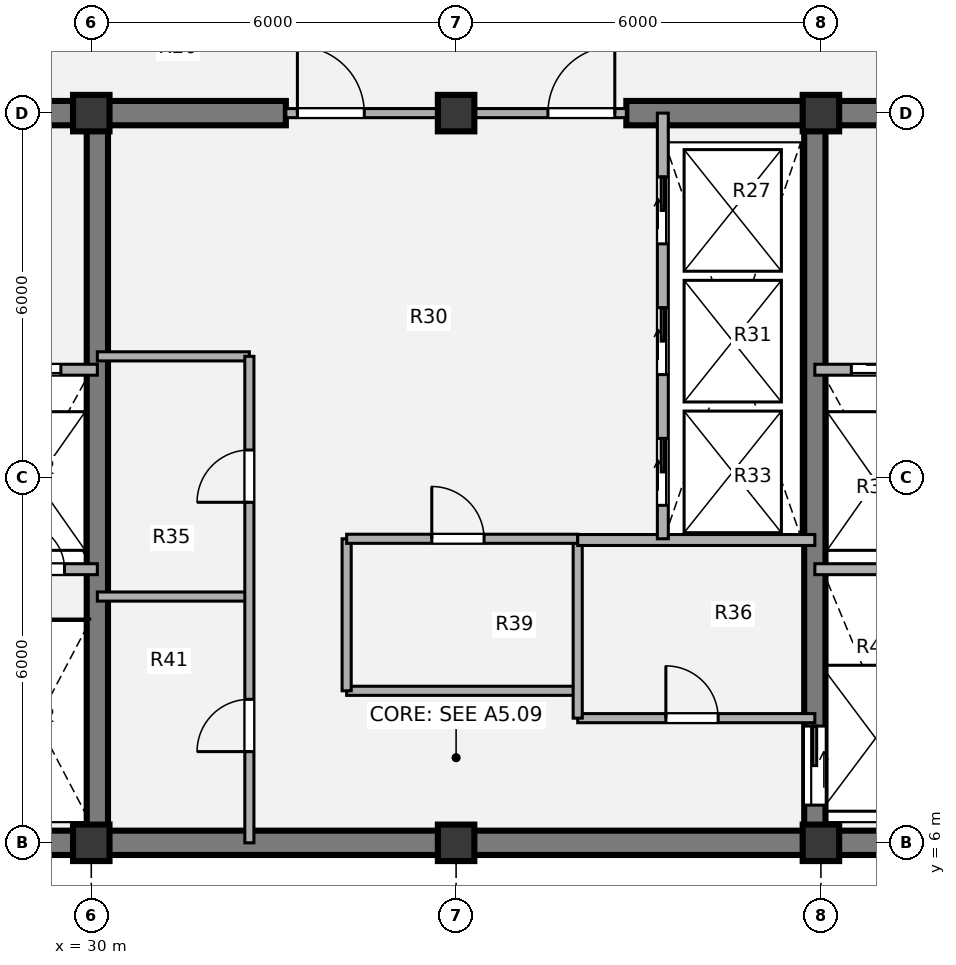
"""IFC4 building model, lengths in metres.
Left out: names, types, materials, properties, quantities, classifications, styles, units other than length and angle.
Written with IfcOpenShell. Run it as: python <this file> out.ifc"""

import sys

from ifc_helpers import new_model, si_unit, direction, frame, frame_2d, origin, origin_2d, place, context, subcontext, project, spatial, rectangle, extrude, source, transform, mapped, element, fill, save


model = new_model("IFC4")
c1 = context("Model", 3, precision=1e-05, world=origin(), true_north=direction((0.0, 1.0)))
c2 = subcontext(c1, "Body", "Model", "MODEL_VIEW")
j1 = project(units=[si_unit("LENGTHUNIT", "METRE"), si_unit("PLANEANGLEUNIT", "RADIAN")], contexts=[c1])
p1 = place(None, origin())
s1 = spatial("IfcSite", under=j1, at=p1, CompositionType="ELEMENT")
p2 = place(p1, origin())
s2 = spatial("IfcBuilding", under=s1, at=p2, CompositionType="ELEMENT")
p3 = place(p2, frame((0.0, 0.0, 238.14)))
s3 = spatial("IfcBuildingStorey", under=s2, at=p3, CompositionType="ELEMENT", Elevation=238.14)
m1 = source(origin(), c2, "Body", "SweptSolid", [
    extrude(rectangle(XDim=0.6, YDim=0.6, at=origin_2d()), origin(), (0.0, 0.0, 1.0), 3.78),
])
for number, where, z_axis, x_axis in (
    (1, (30.0, 6.0, 0.0), (0.0, 0.0, 1.0), (1.0, 0.0, 0.0)),
    (2, (36.0, 6.0, 0.0), (0.0, 0.0, 1.0), (1.0, 0.0, 0.0)),
    (3, (42.0, 6.0, 0.0), (0.0, 0.0, 1.0), (1.0, 0.0, 0.0)),
    (4, (30.0, 18.0, 0.0), (0.0, 0.0, 1.0), (1.0, 0.0, 0.0)),
    (5, (36.0, 18.0, 0.0), (0.0, 0.0, 1.0), (1.0, 0.0, 0.0)),
    (6, (42.0, 18.0, 0.0), (0.0, 0.0, 1.0), (1.0, 0.0, 0.0)),
):
    element("IfcColumn", number, at=place(p3, frame(where, z_axis=z_axis, x_axis=x_axis)), inside=s3, PredefinedType="COLUMN", context=c2, shape_type="MappedRepresentation", body=[
        mapped(m1, transform((0.0, 0.0, 0.0), x_axis=(1.0, 0.0, 0.0), y_axis=(0.0, 1.0, 0.0), z_axis=(0.0, 0.0, 1.0), scale=1.0)),
    ])
p4 = place(p3, frame((48.2, 6.0, 0.0), z_axis=(0.0, 0.0, 1.0), x_axis=(-1.0, 0.0, 0.0)))
e7 = element("IfcWall", 7, at=p4, inside=s3, PredefinedType="SHEAR", context=c2, shape_type="SweptSolid", body=[
    extrude(rectangle(XDim=24.4, YDim=0.4, at=frame_2d((12.2, 0.0))), origin(), (0.0, 0.0, 1.0), 3.78),
])
p5 = place(p3, frame((23.8, 18.0, 0.0), z_axis=(0.0, 0.0, 1.0), x_axis=(1.0, 0.0, 0.0)))
e8 = element("IfcWall", 8, at=p5, inside=s3, PredefinedType="SHEAR", context=c2, shape_type="SweptSolid", body=[
    extrude(rectangle(XDim=9.4, YDim=0.4, at=frame_2d((4.7, 0.0))), origin(), (0.0, 0.0, 1.0), 3.78),
])
p6 = place(p5, frame((2.95, 0.0, 0.0)))
e9 = element("IfcOpeningElement", 9, at=p6, cuts=e8, PredefinedType="OPENING", context=c2, shape_type="SweptSolid", body=[
    extrude(rectangle(XDim=1.1, YDim=2.1, at=origin_2d()), frame((0.55, 0.21, 1.05), z_axis=(0.0, -1.0, 0.0), x_axis=(1.0, 0.0, 0.0)), (0.0, 0.0, 1.0), 0.42),
])
p7 = place(p3, frame((38.8, 18.0, 0.0), z_axis=(0.0, 0.0, 1.0), x_axis=(1.0, 0.0, 0.0)))
e10 = element("IfcWall", 10, at=p7, inside=s3, PredefinedType="SHEAR", context=c2, shape_type="SweptSolid", body=[
    extrude(rectangle(XDim=9.4, YDim=0.4, at=frame_2d((4.7, 0.0))), origin(), (0.0, 0.0, 1.0), 3.78),
])
p8 = place(p7, frame((5.45, 0.0, 0.0)))
e11 = element("IfcOpeningElement", 11, at=p8, cuts=e10, PredefinedType="OPENING", context=c2, shape_type="SweptSolid", body=[
    extrude(rectangle(XDim=1.1, YDim=2.1, at=origin_2d()), frame((0.55, 0.21, 1.05), z_axis=(0.0, -1.0, 0.0), x_axis=(1.0, 0.0, 0.0)), (0.0, 0.0, 1.0), 0.42),
])
p9 = place(p3, frame((30.1, 6.0, 0.0), z_axis=(0.0, 0.0, 1.0), x_axis=(0.0, 1.0, 0.0)))
e12 = element("IfcWall", 12, at=p9, inside=s3, PredefinedType="SHEAR", context=c2, shape_type="SweptSolid", body=[
    extrude(rectangle(XDim=12.0, YDim=0.35, at=frame_2d((6.0, 0.0))), origin(), (0.0, 0.0, 1.0), 3.78),
])
p10 = place(p3, frame((41.9, 18.0, 0.0), z_axis=(0.0, 0.0, 1.0), x_axis=(0.0, -1.0, 0.0)))
e13 = element("IfcWall", 13, at=p10, inside=s3, PredefinedType="SHEAR", context=c2, shape_type="SweptSolid", body=[
    extrude(rectangle(XDim=12.0, YDim=0.35, at=frame_2d((6.0, 0.0))), origin(), (0.0, 0.0, 1.0), 3.78),
])
p11 = place(p10, frame((10.08, 0.0, 0.0)))
e14 = element("IfcOpeningElement", 14, at=p11, cuts=e13, PredefinedType="OPENING", context=c2, shape_type="SweptSolid", body=[
    extrude(rectangle(XDim=1.3, YDim=2.1, at=origin_2d()), frame((0.65, 0.185, 1.05), z_axis=(0.0, -1.0, 0.0), x_axis=(1.0, 0.0, 0.0)), (0.0, 0.0, 1.0), 0.37),
])
p12 = place(p3, frame((30.1, 14.0, 0.0), z_axis=(0.0, 0.0, 1.0), x_axis=(1.0, 0.0, 0.0)))
e15 = element("IfcWall", 15, at=p12, inside=s3, PredefinedType="PARTITIONING", context=c2, shape_type="SweptSolid", body=[
    extrude(rectangle(XDim=2.5, YDim=0.15, at=frame_2d((1.25, 0.0))), origin(), (0.0, 0.0, 1.0), 3.5),
])
p13 = place(p3, frame((34.2, 8.5, 0.0), z_axis=(0.0, 0.0, 1.0), x_axis=(1.0, 0.0, 0.0)))
e16 = element("IfcWall", 16, at=p13, inside=s3, PredefinedType="PARTITIONING", context=c2, shape_type="SweptSolid", body=[
    extrude(rectangle(XDim=3.8, YDim=0.15, at=frame_2d((1.9, 0.0))), origin(), (0.0, 0.0, 1.0), 3.5),
])
p14 = place(p3, frame((38.0, 8.05, 0.0), z_axis=(0.0, 0.0, 1.0), x_axis=(1.0, 0.0, 0.0)))
e17 = element("IfcWall", 17, at=p14, inside=s3, PredefinedType="PARTITIONING", context=c2, shape_type="SweptSolid", body=[
    extrude(rectangle(XDim=3.9, YDim=0.15, at=frame_2d((1.95, 0.0))), origin(), (0.0, 0.0, 1.0), 3.5),
])
p15 = place(p14, frame((1.45, 0.0, 0.0)))
e18 = element("IfcOpeningElement", 18, at=p15, cuts=e17, PredefinedType="OPENING", context=c2, shape_type="SweptSolid", body=[
    extrude(rectangle(XDim=0.86, YDim=2.1, at=origin_2d()), frame((0.43, 0.085, 1.05), z_axis=(0.0, -1.0, 0.0), x_axis=(1.0, 0.0, 0.0)), (0.0, 0.0, 1.0), 0.17),
])
p16 = place(p3, frame((34.2, 8.5, 0.0), z_axis=(0.0, 0.0, 1.0), x_axis=(0.0, 1.0, 0.0)))
e19 = element("IfcWall", 19, at=p16, inside=s3, PredefinedType="PARTITIONING", context=c2, shape_type="SweptSolid", body=[
    extrude(rectangle(XDim=2.5, YDim=0.15, at=frame_2d((1.25, 0.0))), origin(), (0.0, 0.0, 1.0), 3.5),
])
p17 = place(p3, frame((38.0, 8.05, 0.0), z_axis=(0.0, 0.0, 1.0), x_axis=(0.0, 1.0, 0.0)))
e20 = element("IfcWall", 20, at=p17, inside=s3, PredefinedType="PARTITIONING", context=c2, shape_type="SweptSolid", body=[
    extrude(rectangle(XDim=2.95, YDim=0.15, at=frame_2d((1.475, 0.0))), origin(), (0.0, 0.0, 1.0), 3.5),
])
p18 = place(p3, frame((34.2, 11.0, 0.0), z_axis=(0.0, 0.0, 1.0), x_axis=(1.0, 0.0, 0.0)))
e21 = element("IfcWall", 21, at=p18, inside=s3, PredefinedType="PARTITIONING", context=c2, shape_type="SweptSolid", body=[
    extrude(rectangle(XDim=3.8, YDim=0.15, at=frame_2d((1.9, 0.0))), origin(), (0.0, 0.0, 1.0), 3.5),
])
p19 = place(p18, frame((1.4, 0.0, 0.0)))
e22 = element("IfcOpeningElement", 22, at=p19, cuts=e21, PredefinedType="OPENING", context=c2, shape_type="SweptSolid", body=[
    extrude(rectangle(XDim=0.86, YDim=2.1, at=origin_2d()), frame((0.43, 0.085, 1.05), z_axis=(0.0, -1.0, 0.0), x_axis=(1.0, 0.0, 0.0)), (0.0, 0.0, 1.0), 0.17),
])
p20 = place(p3, frame((38.0, 10.98, 0.0), z_axis=(0.0, 0.0, 1.0), x_axis=(1.0, 0.0, 0.0)))
e23 = element("IfcWall", 23, at=p20, inside=s3, PredefinedType="PARTITIONING", context=c2, shape_type="SweptSolid", body=[
    extrude(rectangle(XDim=3.9, YDim=0.18, at=frame_2d((1.95, 0.0))), origin(), (0.0, 0.0, 1.0), 3.5),
])
p21 = place(p3, frame((30.1, 10.05, 0.0), z_axis=(0.0, 0.0, 1.0), x_axis=(1.0, 0.0, 0.0)))
e24 = element("IfcWall", 24, at=p21, inside=s3, PredefinedType="PARTITIONING", context=c2, shape_type="SweptSolid", body=[
    extrude(rectangle(XDim=2.5, YDim=0.15, at=frame_2d((1.25, 0.0))), origin(), (0.0, 0.0, 1.0), 3.5),
])
p22 = place(p3, frame((32.6, 6.0, 0.0), z_axis=(0.0, 0.0, 1.0), x_axis=(0.0, 1.0, 0.0)))
e25 = element("IfcWall", 25, at=p22, inside=s3, PredefinedType="PARTITIONING", context=c2, shape_type="SweptSolid", body=[
    extrude(rectangle(XDim=8.0, YDim=0.15, at=frame_2d((4.0, 0.0))), origin(), (0.0, 0.0, 1.0), 3.5),
])
p23 = place(p22, frame((1.5, 0.0, 0.0)))
e26 = element("IfcOpeningElement", 26, at=p23, cuts=e25, PredefinedType="OPENING", context=c2, shape_type="SweptSolid", body=[
    extrude(rectangle(XDim=0.86, YDim=2.1, at=origin_2d()), frame((0.43, 0.085, 1.05), z_axis=(0.0, -1.0, 0.0), x_axis=(1.0, 0.0, 0.0)), (0.0, 0.0, 1.0), 0.17),
])
p24 = place(p22, frame((5.6, 0.0, 0.0)))
e27 = element("IfcOpeningElement", 27, at=p24, cuts=e25, PredefinedType="OPENING", context=c2, shape_type="SweptSolid", body=[
    extrude(rectangle(XDim=0.86, YDim=2.1, at=origin_2d()), frame((0.43, 0.085, 1.05), z_axis=(0.0, -1.0, 0.0), x_axis=(1.0, 0.0, 0.0)), (0.0, 0.0, 1.0), 0.17),
])
p25 = place(p3, frame((33.2, 18.0, 0.0), z_axis=(0.0, 0.0, 1.0), x_axis=(1.0, 0.0, 0.0)))
e28 = element("IfcWall", 28, at=p25, inside=s3, PredefinedType="PARTITIONING", context=c2, shape_type="SweptSolid", body=[
    extrude(rectangle(XDim=5.6, YDim=0.15, at=frame_2d((2.8, 0.0))), origin(), (0.0, 0.0, 1.0), 2.515),
])
p26 = place(p25, frame((0.19, 0.0, 0.0)))
e29 = element("IfcOpeningElement", 29, at=p26, cuts=e28, PredefinedType="OPENING", context=c2, shape_type="SweptSolid", body=[
    extrude(rectangle(XDim=1.1, YDim=2.1, at=origin_2d()), frame((0.55, 0.085, 1.05), z_axis=(0.0, -1.0, 0.0), x_axis=(1.0, 0.0, 0.0)), (0.0, 0.0, 1.0), 0.17),
])
p27 = place(p25, frame((4.31, 0.0, 0.0)))
e30 = element("IfcOpeningElement", 30, at=p27, cuts=e28, PredefinedType="OPENING", context=c2, shape_type="SweptSolid", body=[
    extrude(rectangle(XDim=1.1, YDim=2.1, at=origin_2d()), frame((0.55, 0.085, 1.05), z_axis=(0.0, -1.0, 0.0), x_axis=(1.0, 0.0, 0.0)), (0.0, 0.0, 1.0), 0.17),
])
p28 = place(p3, frame((24.0, 13.78, 0.0), z_axis=(0.0, 0.0, 1.0), x_axis=(1.0, 0.0, 0.0)))
e31 = element("IfcWall", 31, at=p28, inside=s3, PredefinedType="PARTITIONING", context=c2, shape_type="SweptSolid", body=[
    extrude(rectangle(XDim=6.1, YDim=0.18, at=frame_2d((3.05, 0.0))), origin(), (0.0, 0.0, 1.0), 3.5),
])
p29 = place(p28, frame((1.15, 0.0, 0.0)))
e32 = element("IfcOpeningElement", 32, at=p29, cuts=e31, PredefinedType="OPENING", context=c2, shape_type="SweptSolid", body=[
    extrude(rectangle(XDim=1.1, YDim=2.1, at=origin_2d()), frame((0.55, 0.1, 1.05), z_axis=(0.0, -1.0, 0.0), x_axis=(1.0, 0.0, 0.0)), (0.0, 0.0, 1.0), 0.2),
])
p30 = place(p28, frame((4.4, 0.0, 0.0)))
e33 = element("IfcOpeningElement", 33, at=p30, cuts=e31, PredefinedType="OPENING", context=c2, shape_type="SweptSolid", body=[
    extrude(rectangle(XDim=1.1, YDim=2.1, at=origin_2d()), frame((0.55, 0.1, 1.05), z_axis=(0.0, -1.0, 0.0), x_axis=(1.0, 0.0, 0.0)), (0.0, 0.0, 1.0), 0.2),
])
p31 = place(p3, frame((28.15, 10.5, 0.0), z_axis=(0.0, 0.0, 1.0), x_axis=(1.0, 0.0, 0.0)))
e34 = element("IfcWall", 34, at=p31, inside=s3, PredefinedType="PARTITIONING", context=c2, shape_type="SweptSolid", body=[
    extrude(rectangle(XDim=1.95, YDim=0.18, at=frame_2d((0.975, 0.0))), origin(), (0.0, 0.0, 1.0), 3.5),
])
p32 = place(p31, frame((0.65, 0.0, 0.0)))
e35 = element("IfcOpeningElement", 35, at=p32, cuts=e34, PredefinedType="OPENING", context=c2, shape_type="SweptSolid", body=[
    extrude(rectangle(XDim=0.76, YDim=2.05, at=origin_2d()), frame((0.38, 0.1, 1.025), z_axis=(0.0, -1.0, 0.0), x_axis=(1.0, 0.0, 0.0)), (0.0, 0.0, 1.0), 0.2),
])
p33 = place(p3, frame((41.9, 13.78, 0.0), z_axis=(0.0, 0.0, 1.0), x_axis=(1.0, 0.0, 0.0)))
e36 = element("IfcWall", 36, at=p33, inside=s3, PredefinedType="PARTITIONING", context=c2, shape_type="SweptSolid", body=[
    extrude(rectangle(XDim=6.1, YDim=0.18, at=frame_2d((3.05, 0.0))), origin(), (0.0, 0.0, 1.0), 3.5),
])
p34 = place(p33, frame((0.6, 0.0, 0.0)))
e37 = element("IfcOpeningElement", 37, at=p34, cuts=e36, PredefinedType="OPENING", context=c2, shape_type="SweptSolid", body=[
    extrude(rectangle(XDim=1.1, YDim=2.1, at=origin_2d()), frame((0.55, 0.1, 1.05), z_axis=(0.0, -1.0, 0.0), x_axis=(1.0, 0.0, 0.0)), (0.0, 0.0, 1.0), 0.2),
])
p35 = place(p33, frame((3.8, 0.0, 0.0)))
e38 = element("IfcOpeningElement", 38, at=p35, cuts=e36, PredefinedType="OPENING", context=c2, shape_type="SweptSolid", body=[
    extrude(rectangle(XDim=1.1, YDim=2.1, at=origin_2d()), frame((0.55, 0.1, 1.05), z_axis=(0.0, -1.0, 0.0), x_axis=(1.0, 0.0, 0.0)), (0.0, 0.0, 1.0), 0.2),
])
p36 = place(p3, frame((41.9, 10.5, 0.0), z_axis=(0.0, 0.0, 1.0), x_axis=(1.0, 0.0, 0.0)))
e39 = element("IfcWall", 39, at=p36, inside=s3, PredefinedType="PARTITIONING", context=c2, shape_type="SweptSolid", body=[
    extrude(rectangle(XDim=1.95, YDim=0.18, at=frame_2d((0.975, 0.0))), origin(), (0.0, 0.0, 1.0), 3.5),
])
p37 = place(p3, frame((39.4, 11.0, 0.0), z_axis=(0.0, 0.0, 1.0), x_axis=(0.0, 1.0, 0.0)))
e40 = element("IfcWall", 40, at=p37, inside=s3, PredefinedType="PARTITIONING", context=c2, shape_type="SweptSolid", body=[
    extrude(rectangle(XDim=7.0, YDim=0.18, at=frame_2d((3.5, 0.0))), origin(), (0.0, 0.0, 1.0), 3.5),
])
p38 = place(p37, frame((0.55, 0.0, 0.0)))
e41 = element("IfcOpeningElement", 41, at=p38, cuts=e40, PredefinedType="OPENING", context=c2, shape_type="SweptSolid", body=[
    extrude(rectangle(XDim=1.1, YDim=2.1, at=origin_2d()), frame((0.55, 0.1, 1.05), z_axis=(0.0, -1.0, 0.0), x_axis=(1.0, 0.0, 0.0)), (0.0, 0.0, 1.0), 0.2),
])
p39 = place(p37, frame((2.7, 0.0, 0.0)))
e42 = element("IfcOpeningElement", 42, at=p39, cuts=e40, PredefinedType="OPENING", context=c2, shape_type="SweptSolid", body=[
    extrude(rectangle(XDim=1.1, YDim=2.1, at=origin_2d()), frame((0.55, 0.1, 1.05), z_axis=(0.0, -1.0, 0.0), x_axis=(1.0, 0.0, 0.0)), (0.0, 0.0, 1.0), 0.2),
])
p40 = place(p37, frame((4.85, 0.0, 0.0)))
e43 = element("IfcOpeningElement", 43, at=p40, cuts=e40, PredefinedType="OPENING", context=c2, shape_type="SweptSolid", body=[
    extrude(rectangle(XDim=1.1, YDim=2.1, at=origin_2d()), frame((0.55, 0.1, 1.05), z_axis=(0.0, -1.0, 0.0), x_axis=(1.0, 0.0, 0.0)), (0.0, 0.0, 1.0), 0.2),
])
m2 = source(origin(), c2, "Body", "SweptSolid", [
    extrude(rectangle(XDim=0.86, YDim=2.1, at=origin_2d()), frame((0.43, 0.025, 1.05), z_axis=(0.0, -1.0, 0.0), x_axis=(1.0, 0.0, 0.0)), (0.0, 0.0, 1.0), 0.05),
])
p41 = place(p15, origin())
e44 = element("IfcDoor", 44, at=p41, inside=s3, OperationType="SINGLE_SWING_LEFT", PredefinedType="DOOR", context=c2, shape_type="MappedRepresentation", body=[
    mapped(m2, transform((0.0, 0.0, 0.0), x_axis=(1.0, 0.0, 0.0), y_axis=(0.0, 1.0, 0.0), z_axis=(0.0, 0.0, 1.0), scale=1.0)),
])
fill(e18, e44)
p42 = place(p19, origin())
e45 = element("IfcDoor", 45, at=p42, inside=s3, OperationType="SINGLE_SWING_LEFT", PredefinedType="DOOR", context=c2, shape_type="MappedRepresentation", body=[
    mapped(m2, transform((0.0, 0.0, 0.0), x_axis=(1.0, 0.0, 0.0), y_axis=(0.0, 1.0, 0.0), z_axis=(0.0, 0.0, 1.0), scale=1.0)),
])
fill(e22, e45)
p43 = place(p23, origin())
e46 = element("IfcDoor", 46, at=p43, inside=s3, OperationType="SINGLE_SWING_LEFT", PredefinedType="DOOR", context=c2, shape_type="MappedRepresentation", body=[
    mapped(m2, transform((0.0, 0.0, 0.0), x_axis=(1.0, 0.0, 0.0), y_axis=(0.0, 1.0, 0.0), z_axis=(0.0, 0.0, 1.0), scale=1.0)),
])
fill(e26, e46)
p44 = place(p24, origin())
e47 = element("IfcDoor", 47, at=p44, inside=s3, OperationType="SINGLE_SWING_LEFT", PredefinedType="DOOR", context=c2, shape_type="MappedRepresentation", body=[
    mapped(m2, transform((0.0, 0.0, 0.0), x_axis=(1.0, 0.0, 0.0), y_axis=(0.0, 1.0, 0.0), z_axis=(0.0, 0.0, 1.0), scale=1.0)),
])
fill(e27, e47)
m3 = source(origin(), c2, "Body", "SweptSolid", [
    extrude(rectangle(XDim=1.1, YDim=2.1, at=origin_2d()), frame((0.55, 0.025, 1.05), z_axis=(0.0, -1.0, 0.0), x_axis=(1.0, 0.0, 0.0)), (0.0, 0.0, 1.0), 0.05),
])
p45 = place(p26, origin())
e48 = element("IfcDoor", 48, at=p45, inside=s3, OperationType="SINGLE_SWING_LEFT", PredefinedType="DOOR", context=c2, shape_type="MappedRepresentation", body=[
    mapped(m3, transform((0.0, 0.0, 0.0), x_axis=(1.0, 0.0, 0.0), y_axis=(0.0, 1.0, 0.0), z_axis=(0.0, 0.0, 1.0), scale=1.0)),
])
fill(e29, e48)
p46 = place(p27, origin())
e49 = element("IfcDoor", 49, at=p46, inside=s3, OperationType="SINGLE_SWING_RIGHT", PredefinedType="DOOR", context=c2, shape_type="MappedRepresentation", body=[
    mapped(m3, transform((0.0, 0.0, 0.0), x_axis=(1.0, 0.0, 0.0), y_axis=(0.0, 1.0, 0.0), z_axis=(0.0, 0.0, 1.0), scale=1.0)),
])
fill(e30, e49)
m4 = source(origin(), c2, "Body", "SweptSolid", [
    extrude(rectangle(XDim=1.1, YDim=2.1, at=origin_2d()), frame((0.55, 0.025, 1.05), z_axis=(0.0, -1.0, 0.0), x_axis=(1.0, 0.0, 0.0)), (0.0, 0.0, 1.0), 0.05),
])
p47 = place(p30, origin())
e50 = element("IfcDoor", 50, at=p47, inside=s3, OperationType="SLIDING_TO_LEFT", PredefinedType="DOOR", context=c2, shape_type="MappedRepresentation", body=[
    mapped(m4, transform((0.0, 0.0, 0.0), x_axis=(1.0, 0.0, 0.0), y_axis=(0.0, 1.0, 0.0), z_axis=(0.0, 0.0, 1.0), scale=1.0)),
])
fill(e33, e50)
m5 = source(origin(), c2, "Body", "SweptSolid", [
    extrude(rectangle(XDim=0.76, YDim=2.05, at=origin_2d()), frame((0.38, 0.025, 1.025), z_axis=(0.0, -1.0, 0.0), x_axis=(1.0, 0.0, 0.0)), (0.0, 0.0, 1.0), 0.05),
])
p48 = place(p32, origin())
e51 = element("IfcDoor", 51, at=p48, inside=s3, OperationType="SINGLE_SWING_LEFT", PredefinedType="DOOR", context=c2, shape_type="MappedRepresentation", body=[
    mapped(m5, transform((0.0, 0.0, 0.0), x_axis=(1.0, 0.0, 0.0), y_axis=(0.0, 1.0, 0.0), z_axis=(0.0, 0.0, 1.0), scale=1.0)),
])
fill(e35, e51)
p49 = place(p34, origin())
e52 = element("IfcDoor", 52, at=p49, inside=s3, OperationType="SLIDING_TO_RIGHT", PredefinedType="DOOR", context=c2, shape_type="MappedRepresentation", body=[
    mapped(m4, transform((0.0, 0.0, 0.0), x_axis=(1.0, 0.0, 0.0), y_axis=(0.0, 1.0, 0.0), z_axis=(0.0, 0.0, 1.0), scale=1.0)),
])
fill(e37, e52)
m6 = source(origin(), c2, "Body", "SweptSolid", [
    extrude(rectangle(XDim=1.3, YDim=2.1, at=origin_2d()), frame((0.65, 0.025, 1.05), z_axis=(0.0, -1.0, 0.0), x_axis=(1.0, 0.0, 0.0)), (0.0, 0.0, 1.0), 0.05),
])
p50 = place(p11, origin())
e53 = element("IfcDoor", 53, at=p50, inside=s3, OperationType="SLIDING_TO_LEFT", PredefinedType="DOOR", context=c2, shape_type="MappedRepresentation", body=[
    mapped(m6, transform((0.0, 0.0, 0.0), x_axis=(1.0, 0.0, 0.0), y_axis=(0.0, 1.0, 0.0), z_axis=(0.0, 0.0, 1.0), scale=1.0)),
])
fill(e14, e53)
p51 = place(p38, origin())
e54 = element("IfcDoor", 54, at=p51, inside=s3, OperationType="SLIDING_TO_RIGHT", PredefinedType="DOOR", context=c2, shape_type="MappedRepresentation", body=[
    mapped(m4, transform((0.0, 0.0, 0.0), x_axis=(1.0, 0.0, 0.0), y_axis=(0.0, 1.0, 0.0), z_axis=(0.0, 0.0, 1.0), scale=1.0)),
])
fill(e41, e54)
p52 = place(p39, origin())
e55 = element("IfcDoor", 55, at=p52, inside=s3, OperationType="SLIDING_TO_RIGHT", PredefinedType="DOOR", context=c2, shape_type="MappedRepresentation", body=[
    mapped(m4, transform((0.0, 0.0, 0.0), x_axis=(1.0, 0.0, 0.0), y_axis=(0.0, 1.0, 0.0), z_axis=(0.0, 0.0, 1.0), scale=1.0)),
])
fill(e42, e55)
p53 = place(p40, origin())
e56 = element("IfcDoor", 56, at=p53, inside=s3, OperationType="SLIDING_TO_RIGHT", PredefinedType="DOOR", context=c2, shape_type="MappedRepresentation", body=[
    mapped(m4, transform((0.0, 0.0, 0.0), x_axis=(1.0, 0.0, 0.0), y_axis=(0.0, 1.0, 0.0), z_axis=(0.0, 0.0, 1.0), scale=1.0)),
])
fill(e43, e56)
save(model, sys.argv[1])
